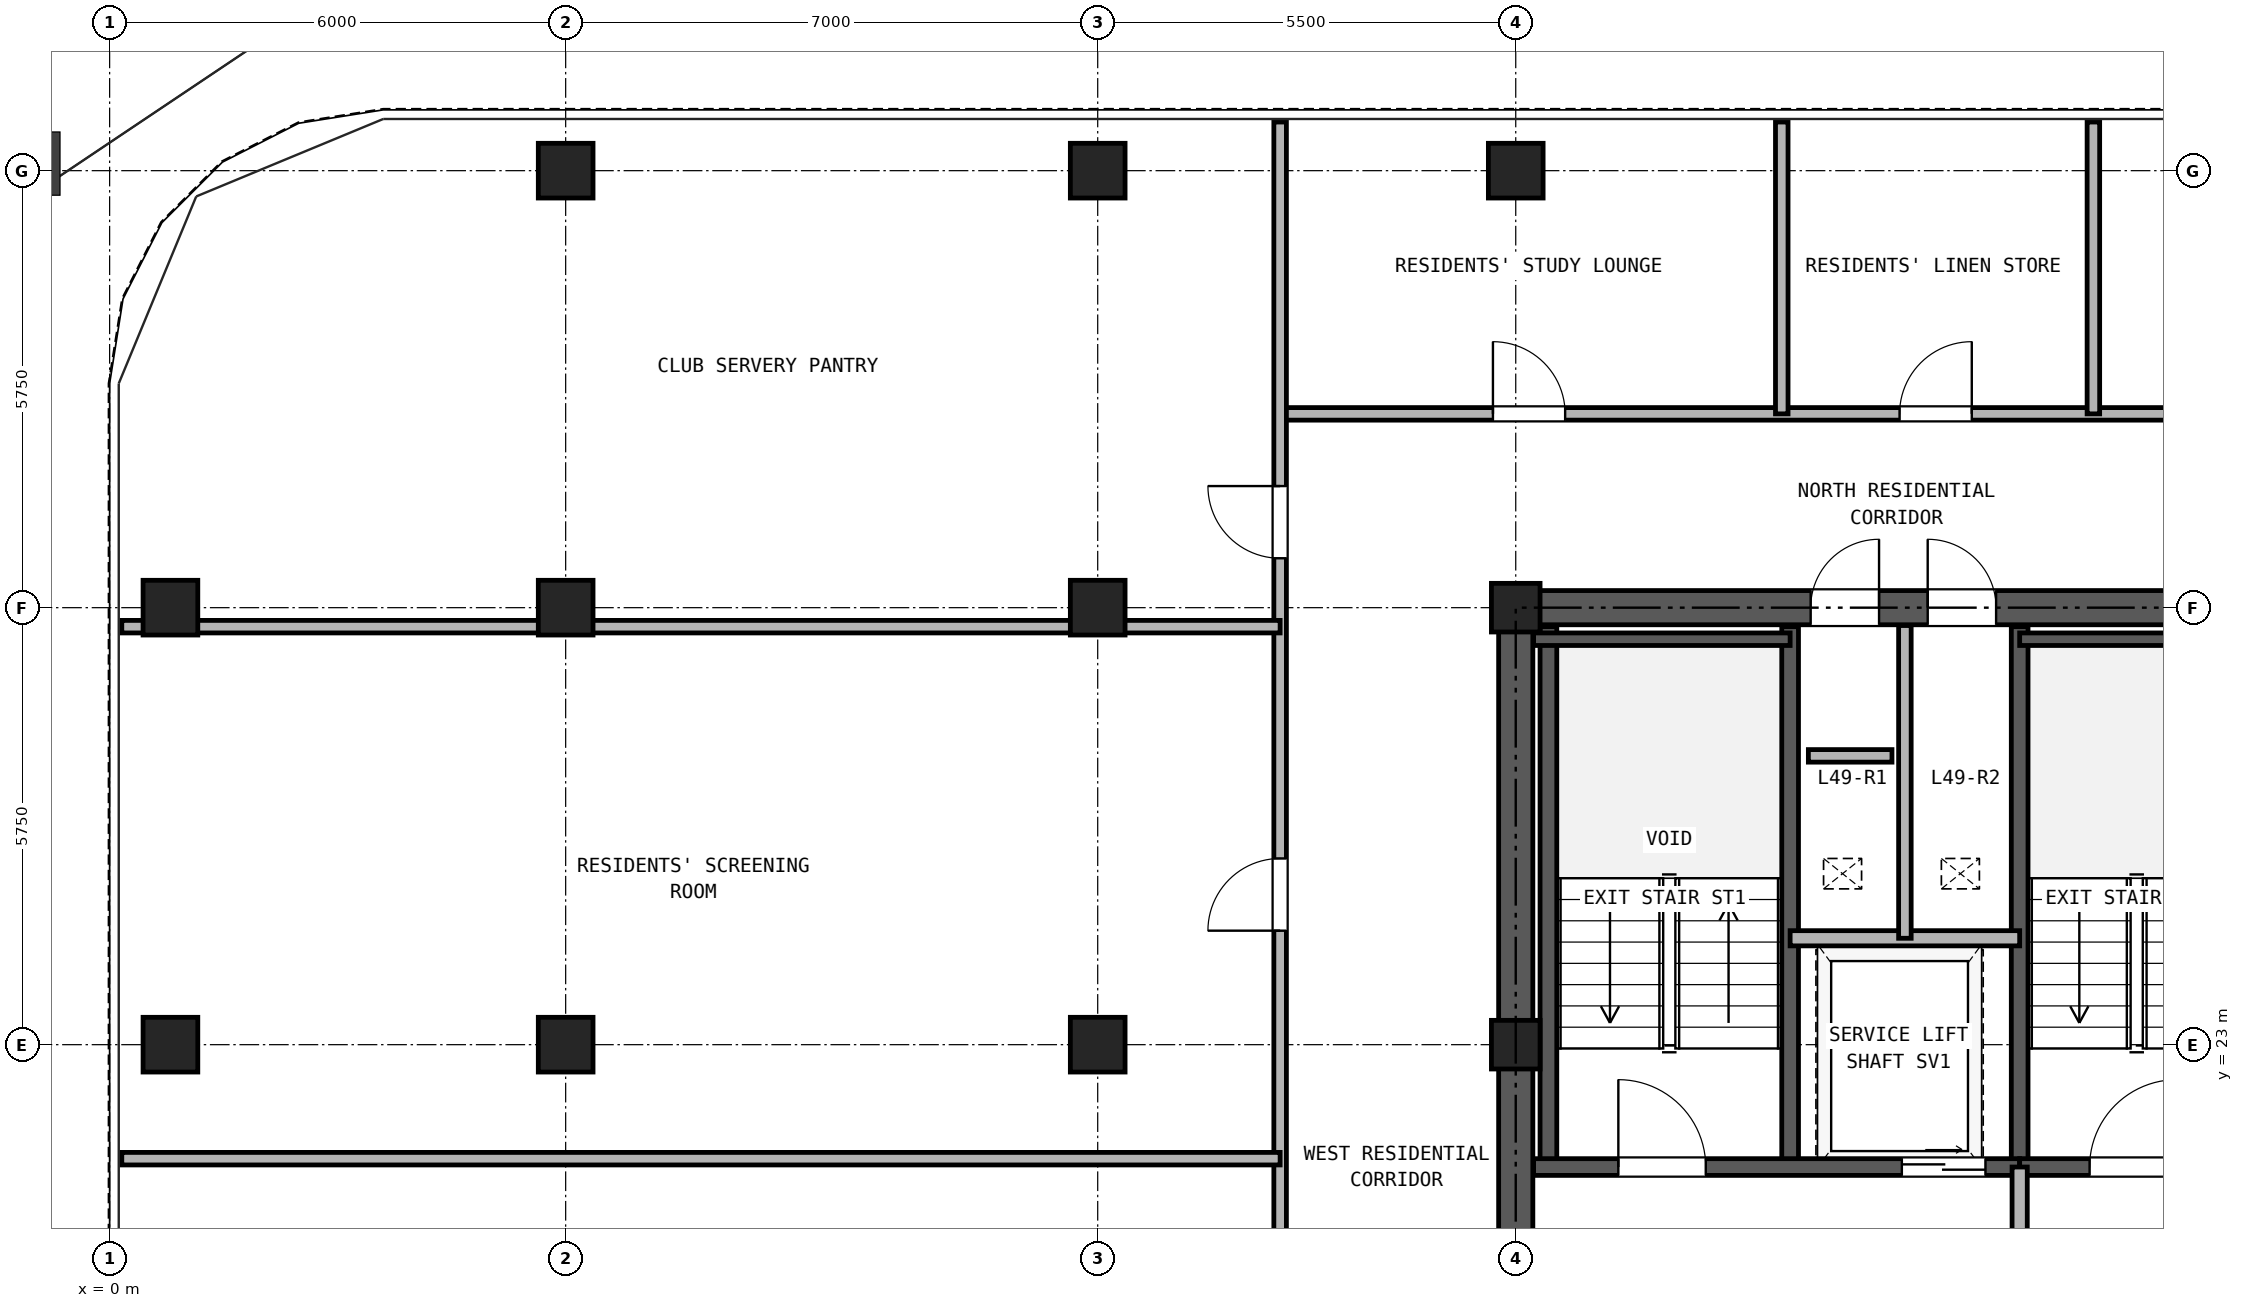
"""IFC4 building model, lengths in metres.
Left out: names, types, materials, properties, quantities, classifications, styles, units other than length and angle.
Written with IfcOpenShell. Run it as: python <this file> out.ifc"""

import sys

from ifc_helpers import new_model, si_unit, direction, frame, frame_2d, origin, origin_2d, place, context, subcontext, project, spatial, rectangle, hollow_rectangle, extrude, source, transform, mapped, element, fill, save


model = new_model("IFC4")
c1 = context("Model", 3, precision=1e-05, world=origin(), true_north=direction((0.0, 1.0)))
c2 = subcontext(c1, "Body", "Model", "MODEL_VIEW")
j1 = project(units=[si_unit("LENGTHUNIT", "METRE"), si_unit("PLANEANGLEUNIT", "RADIAN")], contexts=[c1])
p1 = place(None, origin())
s1 = spatial("IfcSite", under=j1, at=p1, CompositionType="ELEMENT")
p2 = place(p1, origin())
s2 = spatial("IfcBuilding", under=s1, at=p2, CompositionType="ELEMENT")
p3 = place(p2, frame((0.0, 0.0, 175.3)))
s3 = spatial("IfcBuildingStorey", under=s2, at=p3, CompositionType="ELEMENT", Elevation=175.3)
m1 = source(origin(), c2, "Body", "SweptSolid", [
    extrude(hollow_rectangle(XDim=0.72, YDim=0.72, WallThickness=0.04, at=origin_2d()), origin(), (0.0, 0.0, 1.0), 2.95),
])
for number, where, z_axis, x_axis in (
    (1, (6.0, 34.5, 0.0), (0.0, 0.0, 1.0), (1.0, 0.0, 0.0)),
    (2, (13.0, 34.5, 0.0), (0.0, 0.0, 1.0), (1.0, 0.0, 0.0)),
    (3, (18.5, 34.5, 0.0), (0.0, 0.0, 1.0), (1.0, 0.0, 0.0)),
    (4, (0.8, 23.0, 0.0), (0.0, 0.0, 1.0), (1.0, 0.0, 0.0)),
    (5, (0.8, 28.75, 0.0), (0.0, 0.0, 1.0), (1.0, 0.0, 0.0)),
    (6, (6.0, 23.0, 0.0), (0.0, 0.0, 1.0), (1.0, 0.0, 0.0)),
    (7, (6.0, 28.75, 0.0), (0.0, 0.0, 1.0), (1.0, 0.0, 0.0)),
    (8, (13.0, 23.0, 0.0), (0.0, 0.0, 1.0), (1.0, 0.0, 0.0)),
    (9, (13.0, 28.75, 0.0), (0.0, 0.0, 1.0), (1.0, 0.0, 0.0)),
):
    element("IfcColumn", number, at=place(p3, frame(where, z_axis=z_axis, x_axis=x_axis)), inside=s3, PredefinedType="COLUMN", context=c2, shape_type="MappedRepresentation", body=[
        mapped(m1, transform((0.0, 0.0, 0.0), x_axis=(1.0, 0.0, 0.0), y_axis=(0.0, 1.0, 0.0), z_axis=(0.0, 0.0, 1.0), scale=1.0)),
    ])
m2 = source(origin(), c2, "Body", "SweptSolid", [
    extrude(hollow_rectangle(XDim=0.64, YDim=0.64, WallThickness=0.035, at=origin_2d()), origin(), (0.0, 0.0, 1.0), 2.95),
])
for number, where, z_axis, x_axis in (
    (10, (18.5, 23.0, 0.0), (0.0, 0.0, 1.0), (1.0, 0.0, 0.0)),
    (11, (18.5, 28.75, 0.0), (0.0, 0.0, 1.0), (1.0, 0.0, 0.0)),
):
    element("IfcColumn", number, at=place(p3, frame(where, z_axis=z_axis, x_axis=x_axis)), inside=s3, PredefinedType="COLUMN", context=c2, shape_type="MappedRepresentation", body=[
        mapped(m2, transform((0.0, 0.0, 0.0), x_axis=(1.0, 0.0, 0.0), y_axis=(0.0, 1.0, 0.0), z_axis=(0.0, 0.0, 1.0), scale=1.0)),
    ])
p4 = place(p3, frame((18.275, 28.75, 0.0), z_axis=(0.0, 0.0, 1.0), x_axis=(1.0, 0.0, 0.0)))
e12 = element("IfcWall", 12, at=p4, inside=s3, PredefinedType="SHEAR", context=c2, shape_type="SweptSolid", body=[
    extrude(rectangle(XDim=10.45, YDim=0.45, at=frame_2d((5.225, 0.0))), origin(), (0.0, 0.0, 1.0), 2.95),
])
p5 = place(p4, frame((4.105, 0.0, 0.0)))
e13 = element("IfcOpeningElement", 13, at=p5, cuts=e12, PredefinedType="OPENING", context=c2, shape_type="SweptSolid", body=[
    extrude(rectangle(XDim=0.9, YDim=2.05, at=frame_2d((0.45, 1.025))), frame((0.0, 0.235, 0.0), z_axis=(0.0, -1.0, 0.0), x_axis=(1.0, 0.0, 0.0)), (0.0, 0.0, 1.0), 0.47),
])
p6 = place(p4, frame((5.645, 0.0, 0.0)))
e14 = element("IfcOpeningElement", 14, at=p6, cuts=e12, PredefinedType="OPENING", context=c2, shape_type="SweptSolid", body=[
    extrude(rectangle(XDim=0.9, YDim=2.05, at=frame_2d((0.45, 1.025))), frame((0.0, 0.235, 0.0), z_axis=(0.0, -1.0, 0.0), x_axis=(1.0, 0.0, 0.0)), (0.0, 0.0, 1.0), 0.47),
])
p7 = place(p3, frame((18.5, 11.725, 0.0), z_axis=(0.0, 0.0, 1.0), x_axis=(0.0, 1.0, 0.0)))
e15 = element("IfcWall", 15, at=p7, inside=s3, PredefinedType="SHEAR", context=c2, shape_type="SweptSolid", body=[
    extrude(rectangle(XDim=16.8, YDim=0.45, at=frame_2d((8.4, 0.0))), origin(), (0.0, 0.0, 1.0), 2.95),
])
p8 = place(p7, frame((7.425, 0.0, 0.0)))
e16 = element("IfcOpeningElement", 16, at=p8, cuts=e15, PredefinedType="OPENING", context=c2, shape_type="SweptSolid", body=[
    extrude(rectangle(XDim=1.15, YDim=2.2, at=frame_2d((0.575, 1.1))), frame((0.0, 0.235, 0.0), z_axis=(0.0, -1.0, 0.0), x_axis=(1.0, 0.0, 0.0)), (0.0, 0.0, 1.0), 0.47),
])
for number, where, z_axis, x_axis in (
    (17, (18.93, 21.39, 0.0), (0.0, 0.0, 1.0), (0.0, 1.0, 0.0)),
    (18, (22.11, 21.39, 0.0), (0.0, 0.0, 1.0), (0.0, 1.0, 0.0)),
    (19, (25.13, 21.39, 0.0), (0.0, 0.0, 1.0), (0.0, 1.0, 0.0)),
):
    element("IfcWall", number, at=place(p3, frame(where, z_axis=z_axis, x_axis=x_axis)), inside=s3, PredefinedType="SOLIDWALL", context=c2, shape_type="SweptSolid", body=[
        extrude(rectangle(XDim=7.11, YDim=0.22, at=frame_2d((3.555, 0.0))), origin(), (0.0, 0.0, 1.0), 2.95),
    ])
p9 = place(p3, frame((18.735, 28.335, 0.0), z_axis=(0.0, 0.0, 1.0), x_axis=(1.0, 0.0, 0.0)))
e20 = element("IfcWall", 20, at=p9, inside=s3, PredefinedType="PARTITIONING", context=c2, shape_type="SweptSolid", body=[
    extrude(rectangle(XDim=3.375, YDim=0.165, at=frame_2d((1.688, 0.0))), origin(), (0.0, 0.0, 1.0), 2.95),
])
p10 = place(p3, frame((25.13, 28.335, 0.0), z_axis=(0.0, 0.0, 1.0), x_axis=(1.0, 0.0, 0.0)))
e21 = element("IfcWall", 21, at=p10, inside=s3, PredefinedType="PARTITIONING", context=c2, shape_type="SweptSolid", body=[
    extrude(rectangle(XDim=3.135, YDim=0.165, at=frame_2d((1.567, 0.0))), origin(), (0.0, 0.0, 1.0), 2.95),
])
p11 = place(p3, frame((18.735, 21.39, 0.0), z_axis=(0.0, 0.0, 1.0), x_axis=(1.0, 0.0, 0.0)))
e22 = element("IfcWall", 22, at=p11, inside=s3, PredefinedType="SOLIDWALL", context=c2, shape_type="SweptSolid", body=[
    extrude(rectangle(XDim=6.395, YDim=0.22, at=frame_2d((3.197, 0.0))), origin(), (0.0, 0.0, 1.0), 2.95),
])
p12 = place(p11, frame((1.115, 0.0, 0.0)))
e23 = element("IfcOpeningElement", 23, at=p12, cuts=e22, PredefinedType="OPENING", context=c2, shape_type="SweptSolid", body=[
    extrude(rectangle(XDim=1.15, YDim=2.2, at=frame_2d((0.575, 1.1))), frame((0.0, 0.12, 0.0), z_axis=(0.0, -1.0, 0.0), x_axis=(1.0, 0.0, 0.0)), (0.0, 0.0, 1.0), 0.24),
])
p13 = place(p11, frame((4.845, 0.0, 0.0)))
e24 = element("IfcOpeningElement", 24, at=p13, cuts=e22, PredefinedType="OPENING", context=c2, shape_type="SweptSolid", body=[
    extrude(rectangle(XDim=1.1, YDim=2.25, at=frame_2d((0.55, 1.125))), frame((0.0, 0.12, 0.0), z_axis=(0.0, -1.0, 0.0), x_axis=(1.0, 0.0, 0.0)), (0.0, 0.0, 1.0), 0.24),
])
p14 = place(p3, frame((25.13, 21.39, 0.0), z_axis=(0.0, 0.0, 1.0), x_axis=(1.0, 0.0, 0.0)))
e25 = element("IfcWall", 25, at=p14, inside=s3, PredefinedType="SOLIDWALL", context=c2, shape_type="SweptSolid", body=[
    extrude(rectangle(XDim=3.135, YDim=0.22, at=frame_2d((1.567, 0.0))), origin(), (0.0, 0.0, 1.0), 2.95),
])
p15 = place(p14, frame((0.92, 0.0, 0.0)))
e26 = element("IfcOpeningElement", 26, at=p15, cuts=e25, PredefinedType="OPENING", context=c2, shape_type="SweptSolid", body=[
    extrude(rectangle(XDim=1.15, YDim=2.2, at=frame_2d((0.575, 1.1))), frame((0.0, 0.12, 0.0), z_axis=(0.0, -1.0, 0.0), x_axis=(1.0, 0.0, 0.0)), (0.0, 0.0, 1.0), 0.24),
])
p16 = place(p3, frame((22.11, 24.4, 0.0), z_axis=(0.0, 0.0, 1.0), x_axis=(1.0, 0.0, 0.0)))
e27 = element("IfcWall", 27, at=p16, inside=s3, PredefinedType="PARTITIONING", context=c2, shape_type="SweptSolid", body=[
    extrude(rectangle(XDim=3.02, YDim=0.2, at=frame_2d((1.51, 0.0))), origin(), (0.0, 0.0, 1.0), 2.95),
])
p17 = place(p3, frame((23.62, 24.4, 0.0), z_axis=(0.0, 0.0, 1.0), x_axis=(0.0, 1.0, 0.0)))
e28 = element("IfcWall", 28, at=p17, inside=s3, PredefinedType="PARTITIONING", context=c2, shape_type="SweptSolid", body=[
    extrude(rectangle(XDim=4.115, YDim=0.165, at=frame_2d((2.058, 0.0))), origin(), (0.0, 0.0, 1.0), 2.95),
])
p18 = place(p3, frame((25.13, 18.0, 0.0), z_axis=(0.0, 0.0, 1.0), x_axis=(0.0, 1.0, 0.0)))
e29 = element("IfcWall", 29, at=p18, inside=s3, PredefinedType="PARTITIONING", context=c2, shape_type="SweptSolid", body=[
    extrude(rectangle(XDim=3.39, YDim=0.2, at=frame_2d((1.695, 0.0))), origin(), (0.0, 0.0, 1.0), 2.95),
])
p19 = place(p18, frame((1.1, 0.0, 0.0)))
e30 = element("IfcOpeningElement", 30, at=p19, cuts=e29, PredefinedType="OPENING", context=c2, shape_type="SweptSolid", body=[
    extrude(rectangle(XDim=1.15, YDim=2.2, at=frame_2d((0.575, 1.1))), frame((0.0, 0.11, 0.0), z_axis=(0.0, -1.0, 0.0), x_axis=(1.0, 0.0, 0.0)), (0.0, 0.0, 1.0), 0.22),
])
p20 = place(p3, frame((15.4, 31.3, 0.0), z_axis=(0.0, 0.0, 1.0), x_axis=(1.0, 0.0, 0.0)))
e31 = element("IfcWall", 31, at=p20, inside=s3, PredefinedType="PARTITIONING", context=c2, shape_type="SweptSolid", body=[
    extrude(rectangle(XDim=16.2, YDim=0.165, at=frame_2d((8.1, 0.0))), origin(), (0.0, 0.0, 1.0), 2.95),
])
p21 = place(p20, frame((2.8, 0.0, 0.0)))
e32 = element("IfcOpeningElement", 32, at=p21, cuts=e31, PredefinedType="OPENING", context=c2, shape_type="SweptSolid", body=[
    extrude(rectangle(XDim=0.95, YDim=2.15, at=frame_2d((0.475, 1.075))), frame((0.0, 0.093, 0.0), z_axis=(0.0, -1.0, 0.0), x_axis=(1.0, 0.0, 0.0)), (0.0, 0.0, 1.0), 0.185),
])
p22 = place(p20, frame((8.15, 0.0, 0.0)))
e33 = element("IfcOpeningElement", 33, at=p22, cuts=e31, PredefinedType="OPENING", context=c2, shape_type="SweptSolid", body=[
    extrude(rectangle(XDim=0.95, YDim=2.15, at=frame_2d((0.475, 1.075))), frame((0.0, 0.093, 0.0), z_axis=(0.0, -1.0, 0.0), x_axis=(1.0, 0.0, 0.0)), (0.0, 0.0, 1.0), 0.185),
])
p23 = place(p20, frame((12.95, 0.0, 0.0)))
e34 = element("IfcOpeningElement", 34, at=p23, cuts=e31, PredefinedType="OPENING", context=c2, shape_type="SweptSolid", body=[
    extrude(rectangle(XDim=0.92, YDim=2.1, at=frame_2d((0.46, 1.05))), frame((0.0, 0.093, 0.0), z_axis=(0.0, -1.0, 0.0), x_axis=(1.0, 0.0, 0.0)), (0.0, 0.0, 1.0), 0.185),
])
p24 = place(p3, frame((15.4, 10.7, 0.0), z_axis=(0.0, 0.0, 1.0), x_axis=(0.0, 1.0, 0.0)))
e35 = element("IfcWall", 35, at=p24, inside=s3, PredefinedType="PARTITIONING", context=c2, shape_type="SweptSolid", body=[
    extrude(rectangle(XDim=24.44, YDim=0.165, at=frame_2d((12.22, 0.0))), origin(), (0.0, 0.0, 1.0), 2.95),
])
p25 = place(p24, frame((4.9, 0.0, 0.0)))
e36 = element("IfcOpeningElement", 36, at=p25, cuts=e35, PredefinedType="OPENING", context=c2, shape_type="SweptSolid", body=[
    extrude(rectangle(XDim=0.95, YDim=2.15, at=frame_2d((0.475, 1.075))), frame((0.0, 0.093, 0.0), z_axis=(0.0, -1.0, 0.0), x_axis=(1.0, 0.0, 0.0)), (0.0, 0.0, 1.0), 0.185),
])
p26 = place(p24, frame((13.8, 0.0, 0.0)))
e37 = element("IfcOpeningElement", 37, at=p26, cuts=e35, PredefinedType="OPENING", context=c2, shape_type="SweptSolid", body=[
    extrude(rectangle(XDim=0.95, YDim=2.15, at=frame_2d((0.475, 1.075))), frame((0.0, 0.093, 0.0), z_axis=(0.0, -1.0, 0.0), x_axis=(1.0, 0.0, 0.0)), (0.0, 0.0, 1.0), 0.185),
])
p27 = place(p24, frame((18.7, 0.0, 0.0)))
e38 = element("IfcOpeningElement", 38, at=p27, cuts=e35, PredefinedType="OPENING", context=c2, shape_type="SweptSolid", body=[
    extrude(rectangle(XDim=0.95, YDim=2.15, at=frame_2d((0.475, 1.075))), frame((0.0, 0.093, 0.0), z_axis=(0.0, -1.0, 0.0), x_axis=(1.0, 0.0, 0.0)), (0.0, 0.0, 1.0), 0.185),
])
p28 = place(p3, frame((0.16, 21.5, 0.0), z_axis=(0.0, 0.0, 1.0), x_axis=(1.0, 0.0, 0.0)))
e39 = element("IfcWall", 39, at=p28, inside=s3, PredefinedType="PARTITIONING", context=c2, shape_type="SweptSolid", body=[
    extrude(rectangle(XDim=15.24, YDim=0.165, at=frame_2d((7.62, 0.0))), origin(), (0.0, 0.0, 1.0), 2.95),
])
p29 = place(p3, frame((0.16, 28.5, 0.0), z_axis=(0.0, 0.0, 1.0), x_axis=(1.0, 0.0, 0.0)))
e40 = element("IfcWall", 40, at=p29, inside=s3, PredefinedType="PARTITIONING", context=c2, shape_type="SweptSolid", body=[
    extrude(rectangle(XDim=15.24, YDim=0.165, at=frame_2d((7.62, 0.0))), origin(), (0.0, 0.0, 1.0), 2.323),
])
for number, where, z_axis, x_axis in (
    (41, (22.0, 31.3, 0.0), (0.0, 0.0, 1.0), (0.0, 1.0, 0.0)),
    (42, (26.1, 31.3, 0.0), (0.0, 0.0, 1.0), (0.0, 1.0, 0.0)),
):
    element("IfcWall", number, at=place(p3, frame(where, z_axis=z_axis, x_axis=x_axis)), inside=s3, PredefinedType="PARTITIONING", context=c2, shape_type="SweptSolid", body=[
        extrude(rectangle(XDim=3.84, YDim=0.165, at=frame_2d((1.92, 0.0))), origin(), (0.0, 0.0, 1.0), 2.95),
    ])
p30 = place(p3, frame((22.35, 26.8, 0.0), z_axis=(0.0, 0.0, 1.0), x_axis=(1.0, 0.0, 0.0)))
e43 = element("IfcWall", 43, at=p30, inside=s3, PredefinedType="PARTITIONING", context=c2, shape_type="SweptSolid", body=[
    extrude(rectangle(XDim=1.1, YDim=0.165, at=frame_2d((0.55, 0.0))), origin(), (0.0, 0.0, 1.0), 2.95),
])
p31 = place(p12, frame((1.15, 0.0, 0.0), z_axis=(0.0, 0.0, 1.0), x_axis=(-1.0, 0.0, 0.0)))
e44 = element("IfcDoor", 44, at=p31, inside=s3, OperationType="SINGLE_SWING_LEFT", PredefinedType="DOOR", context=c2, shape_type="SweptSolid", body=[
    extrude(rectangle(XDim=1.15, YDim=2.2, at=frame_2d((0.575, 1.1))), frame((0.0, 0.025, 0.0), z_axis=(0.0, -1.0, 0.0), x_axis=(1.0, 0.0, 0.0)), (0.0, 0.0, 1.0), 0.05),
])
fill(e23, e44)
p32 = place(p15, frame((1.15, 0.0, 0.0), z_axis=(0.0, 0.0, 1.0), x_axis=(-1.0, 0.0, 0.0)))
e45 = element("IfcDoor", 45, at=p32, inside=s3, OperationType="SINGLE_SWING_RIGHT", PredefinedType="DOOR", context=c2, shape_type="SweptSolid", body=[
    extrude(rectangle(XDim=1.15, YDim=2.2, at=frame_2d((0.575, 1.1))), frame((0.0, 0.025, 0.0), z_axis=(0.0, -1.0, 0.0), x_axis=(1.0, 0.0, 0.0)), (0.0, 0.0, 1.0), 0.05),
])
fill(e26, e45)
p33 = place(p13, frame((1.1, 0.0, 0.0), z_axis=(0.0, 0.0, 1.0), x_axis=(-1.0, 0.0, 0.0)))
e46 = element("IfcDoor", 46, at=p33, inside=s3, OperationType="DOUBLE_DOOR_SLIDING", PredefinedType="DOOR", context=c2, shape_type="SweptSolid", body=[
    extrude(rectangle(XDim=1.1, YDim=2.25, at=frame_2d((0.55, 1.125))), frame((0.0, 0.025, 0.0), z_axis=(0.0, -1.0, 0.0), x_axis=(1.0, 0.0, 0.0)), (0.0, 0.0, 1.0), 0.05),
])
fill(e24, e46)
p34 = place(p5, origin())
e47 = element("IfcDoor", 47, at=p34, inside=s3, OperationType="SINGLE_SWING_RIGHT", PredefinedType="DOOR", context=c2, shape_type="SweptSolid", body=[
    extrude(rectangle(XDim=0.9, YDim=2.05, at=frame_2d((0.45, 1.025))), frame((0.0, 0.025, 0.0), z_axis=(0.0, -1.0, 0.0), x_axis=(1.0, 0.0, 0.0)), (0.0, 0.0, 1.0), 0.05),
])
fill(e13, e47)
p35 = place(p6, origin())
e48 = element("IfcDoor", 48, at=p35, inside=s3, OperationType="SINGLE_SWING_LEFT", PredefinedType="DOOR", context=c2, shape_type="SweptSolid", body=[
    extrude(rectangle(XDim=0.9, YDim=2.05, at=frame_2d((0.45, 1.025))), frame((0.0, 0.025, 0.0), z_axis=(0.0, -1.0, 0.0), x_axis=(1.0, 0.0, 0.0)), (0.0, 0.0, 1.0), 0.05),
])
fill(e14, e48)
p36 = place(p26, frame((0.95, 0.0, 0.0), z_axis=(0.0, 0.0, 1.0), x_axis=(-1.0, 0.0, 0.0)))
e49 = element("IfcDoor", 49, at=p36, inside=s3, OperationType="SINGLE_SWING_LEFT", PredefinedType="DOOR", context=c2, shape_type="SweptSolid", body=[
    extrude(rectangle(XDim=0.95, YDim=2.15, at=frame_2d((0.475, 1.075))), frame((0.0, 0.025, 0.0), z_axis=(0.0, -1.0, 0.0), x_axis=(1.0, 0.0, 0.0)), (0.0, 0.0, 1.0), 0.05),
])
fill(e37, e49)
p37 = place(p27, frame((0.95, 0.0, 0.0), z_axis=(0.0, 0.0, 1.0), x_axis=(-1.0, 0.0, 0.0)))
e50 = element("IfcDoor", 50, at=p37, inside=s3, OperationType="SINGLE_SWING_RIGHT", PredefinedType="DOOR", context=c2, shape_type="SweptSolid", body=[
    extrude(rectangle(XDim=0.95, YDim=2.15, at=frame_2d((0.475, 1.075))), frame((0.0, 0.025, 0.0), z_axis=(0.0, -1.0, 0.0), x_axis=(1.0, 0.0, 0.0)), (0.0, 0.0, 1.0), 0.05),
])
fill(e38, e50)
p38 = place(p21, origin())
e51 = element("IfcDoor", 51, at=p38, inside=s3, OperationType="SINGLE_SWING_LEFT", PredefinedType="DOOR", context=c2, shape_type="SweptSolid", body=[
    extrude(rectangle(XDim=0.95, YDim=2.15, at=frame_2d((0.475, 1.075))), frame((0.0, 0.025, 0.0), z_axis=(0.0, -1.0, 0.0), x_axis=(1.0, 0.0, 0.0)), (0.0, 0.0, 1.0), 0.05),
])
fill(e32, e51)
p39 = place(p22, origin())
e52 = element("IfcDoor", 52, at=p39, inside=s3, OperationType="SINGLE_SWING_RIGHT", PredefinedType="DOOR", context=c2, shape_type="SweptSolid", body=[
    extrude(rectangle(XDim=0.95, YDim=2.15, at=frame_2d((0.475, 1.075))), frame((0.0, 0.025, 0.0), z_axis=(0.0, -1.0, 0.0), x_axis=(1.0, 0.0, 0.0)), (0.0, 0.0, 1.0), 0.05),
])
fill(e33, e52)
save(model, sys.argv[1])
